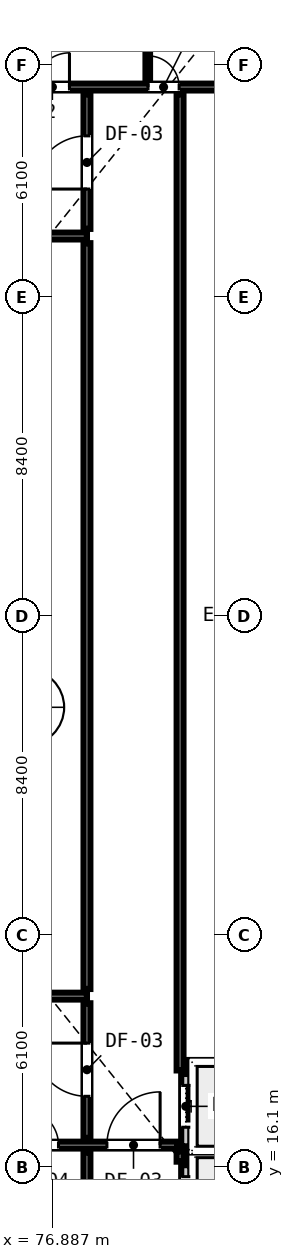
"""IFC4 building model, lengths in metres.
Left out: names, types, materials, properties, quantities, classifications, styles, units other than length and angle.
Written with IfcOpenShell. Run it as: python <this file> out.ifc"""

import sys

from ifc_helpers import new_model, si_unit, direction, frame, frame_2d, origin, place, context, subcontext, project, spatial, rectangle, extrude, element, fill, save


model = new_model("IFC4")
c1 = context("Model", 3, precision=1e-05, world=origin(), true_north=direction((0.0, 1.0)))
c2 = subcontext(c1, "Body", "Model", "MODEL_VIEW")
j1 = project(units=[si_unit("LENGTHUNIT", "METRE"), si_unit("PLANEANGLEUNIT", "RADIAN")], contexts=[c1])
p1 = place(None, origin())
s1 = spatial("IfcSite", under=j1, at=p1, CompositionType="ELEMENT")
p2 = place(p1, origin())
s2 = spatial("IfcBuilding", under=s1, at=p2, CompositionType="ELEMENT")
p3 = place(p2, origin())
s3 = spatial("IfcBuildingStorey", under=s2, at=p3, CompositionType="ELEMENT", Elevation=0.0)
p4 = place(p3, frame((80.4, 16.4, 0.0), z_axis=(0.0, 0.0, 1.0), x_axis=(1.0, 0.0, 0.0)))
e1 = element("IfcWall", 1, at=p4, inside=s3, PredefinedType="PARTITIONING", context=c2, shape_type="SweptSolid", body=[
    extrude(rectangle(XDim=2.2, YDim=0.24, at=frame_2d((1.1, 0.0))), origin(), (0.0, 0.0, 1.0), 4.92),
])
p5 = place(p3, frame((80.4, 14.448, 0.0), z_axis=(0.0, 0.0, 1.0), x_axis=(0.0, 1.0, 0.0)))
e2 = element("IfcWall", 2, at=p5, inside=s3, PredefinedType="PARTITIONING", context=c2, shape_type="SweptSolid", body=[
    extrude(rectangle(XDim=1.704, YDim=0.24, at=frame_2d((0.852, 0.0))), origin(), (0.0, 0.0, 1.0), 4.92),
])
p6 = place(p5, frame((0.302, 0.0, 0.0)))
e3 = element("IfcOpeningElement", 3, at=p6, cuts=e2, PredefinedType="OPENING", context=c2, shape_type="SweptSolid", body=[
    extrude(rectangle(XDim=1.1, YDim=2.15, at=frame_2d((0.55, 1.075))), frame((0.0, 0.13, 0.0), z_axis=(0.0, -1.0, 0.0), x_axis=(1.0, 0.0, 0.0)), (0.0, 0.0, 1.0), 0.26),
])
p7 = place(p3, frame((80.4, 18.8, 0.0), z_axis=(0.0, 0.0, 1.0), x_axis=(1.0, 0.0, 0.0)))
e4 = element("IfcWall", 4, at=p7, inside=s3, PredefinedType="PARTITIONING", context=c2, shape_type="SweptSolid", body=[
    extrude(rectangle(XDim=2.2, YDim=0.24, at=frame_2d((1.1, 0.0))), origin(), (0.0, 0.0, 1.0), 4.92),
])
p8 = place(p3, frame((80.4, 16.648, 0.0), z_axis=(0.0, 0.0, 1.0), x_axis=(0.0, 1.0, 0.0)))
e5 = element("IfcWall", 5, at=p8, inside=s3, PredefinedType="PARTITIONING", context=c2, shape_type="SweptSolid", body=[
    extrude(rectangle(XDim=1.904, YDim=0.24, at=frame_2d((0.952, 0.0))), origin(), (0.0, 0.0, 1.0), 4.92),
])
p9 = place(p8, frame((0.502, 0.0, 0.0)))
e6 = element("IfcOpeningElement", 6, at=p9, cuts=e5, PredefinedType="OPENING", context=c2, shape_type="SweptSolid", body=[
    extrude(rectangle(XDim=1.1, YDim=2.15, at=frame_2d((0.55, 1.075))), frame((0.0, 0.13, 0.0), z_axis=(0.0, -1.0, 0.0), x_axis=(1.0, 0.0, 0.0)), (0.0, 0.0, 1.0), 0.26),
])
p10 = place(p3, frame((64.7, 16.68, 0.0), z_axis=(0.0, 0.0, 1.0), x_axis=(1.0, 0.0, 0.0)))
e7 = element("IfcWall", 7, at=p10, inside=s3, PredefinedType="PARTITIONING", context=c2, shape_type="SweptSolid", body=[
    extrude(rectangle(XDim=15.482, YDim=0.18, at=frame_2d((7.741, 0.0))), origin(), (0.0, 0.0, 1.0), 4.92),
])
p11 = place(p10, frame((13.625, 0.0, 0.0)))
e8 = element("IfcOpeningElement", 8, at=p11, cuts=e7, PredefinedType="OPENING", context=c2, shape_type="SweptSolid", body=[
    extrude(rectangle(XDim=1.4, YDim=2.15, at=frame_2d((0.7, 1.075))), frame((0.0, 0.1, 0.0), z_axis=(0.0, -1.0, 0.0), x_axis=(1.0, 0.0, 0.0)), (0.0, 0.0, 1.0), 0.2),
])
p12 = place(p10, frame((3.25, 0.0, 0.0)))
e9 = element("IfcOpeningElement", 9, at=p12, cuts=e7, PredefinedType="OPENING", context=c2, shape_type="SweptSolid", body=[
    extrude(rectangle(XDim=0.9, YDim=2.1, at=frame_2d((0.45, 1.05))), frame((0.0, 0.1, 0.0), z_axis=(0.0, -1.0, 0.0), x_axis=(1.0, 0.0, 0.0)), (0.0, 0.0, 1.0), 0.2),
])
p13 = place(p10, frame((8.47, 0.0, 0.0)))
e10 = element("IfcOpeningElement", 10, at=p13, cuts=e7, PredefinedType="OPENING", context=c2, shape_type="SweptSolid", body=[
    extrude(rectangle(XDim=0.86, YDim=2.02, at=frame_2d((0.43, 1.01))), frame((0.0, 0.1, 0.0), z_axis=(0.0, -1.0, 0.0), x_axis=(1.0, 0.0, 0.0)), (0.0, 0.0, 1.0), 0.2),
])
p14 = place(p10, frame((11.401, 0.0, 0.0)))
e11 = element("IfcOpeningElement", 11, at=p14, cuts=e7, PredefinedType="OPENING", context=c2, shape_type="SweptSolid", body=[
    extrude(rectangle(XDim=0.95, YDim=2.1, at=frame_2d((0.475, 1.05))), frame((0.0, 0.1, 0.0), z_axis=(0.0, -1.0, 0.0), x_axis=(1.0, 0.0, 0.0)), (0.0, 0.0, 1.0), 0.2),
])
for number, where, z_axis, x_axis in (
    (12, (59.8, 20.6, 0.0), (0.0, 0.0, 1.0), (1.0, 0.0, 0.0)),
    (13, (59.8, 40.6, 0.0), (0.0, 0.0, 1.0), (1.0, 0.0, 0.0)),
):
    element("IfcWall", number, at=place(p3, frame(where, z_axis=z_axis, x_axis=x_axis)), inside=s3, PredefinedType="PARTITIONING", context=c2, shape_type="SweptSolid", body=[
        extrude(rectangle(XDim=18.0, YDim=0.18, at=frame_2d((9.0, 0.0))), origin(), (0.0, 0.0, 1.0), 4.92),
    ])
p15 = place(p3, frame((64.7, 44.52, 0.0), z_axis=(0.0, 0.0, 1.0), x_axis=(1.0, 0.0, 0.0)))
e14 = element("IfcWall", 14, at=p15, inside=s3, PredefinedType="PARTITIONING", context=c2, shape_type="SweptSolid", body=[
    extrude(rectangle(XDim=18.188, YDim=0.18, at=frame_2d((9.094, 0.0))), origin(), (0.0, 0.0, 1.0), 4.92),
])
p16 = place(p15, frame((3.25, 0.0, 0.0)))
e15 = element("IfcOpeningElement", 15, at=p16, cuts=e14, PredefinedType="OPENING", context=c2, shape_type="SweptSolid", body=[
    extrude(rectangle(XDim=0.9, YDim=2.1, at=frame_2d((0.45, 1.05))), frame((0.0, 0.1, 0.0), z_axis=(0.0, -1.0, 0.0), x_axis=(1.0, 0.0, 0.0)), (0.0, 0.0, 1.0), 0.2),
])
p17 = place(p15, frame((8.77, 0.0, 0.0)))
e16 = element("IfcOpeningElement", 16, at=p17, cuts=e14, PredefinedType="OPENING", context=c2, shape_type="SweptSolid", body=[
    extrude(rectangle(XDim=0.86, YDim=2.02, at=frame_2d((0.43, 1.01))), frame((0.0, 0.1, 0.0), z_axis=(0.0, -1.0, 0.0), x_axis=(1.0, 0.0, 0.0)), (0.0, 0.0, 1.0), 0.2),
])
p18 = place(p15, frame((11.74, 0.0, 0.0)))
e17 = element("IfcOpeningElement", 17, at=p18, cuts=e14, PredefinedType="OPENING", context=c2, shape_type="SweptSolid", body=[
    extrude(rectangle(XDim=0.9, YDim=2.1, at=frame_2d((0.45, 1.05))), frame((0.0, 0.1, 0.0), z_axis=(0.0, -1.0, 0.0), x_axis=(1.0, 0.0, 0.0)), (0.0, 0.0, 1.0), 0.2),
])
p19 = place(p15, frame((14.706, 0.0, 0.0)))
e18 = element("IfcOpeningElement", 18, at=p19, cuts=e14, PredefinedType="OPENING", context=c2, shape_type="SweptSolid", body=[
    extrude(rectangle(XDim=0.82, YDim=2.0, at=frame_2d((0.41, 1.0))), frame((0.0, 0.1, 0.0), z_axis=(0.0, -1.0, 0.0), x_axis=(1.0, 0.0, 0.0)), (0.0, 0.0, 1.0), 0.2),
])
p20 = place(p3, frame((77.8, 12.912, 0.0), z_axis=(0.0, 0.0, 1.0), x_axis=(0.0, 1.0, 0.0)))
e19 = element("IfcWall", 19, at=p20, inside=s3, PredefinedType="PARTITIONING", context=c2, shape_type="SweptSolid", body=[
    extrude(rectangle(XDim=3.58, YDim=0.18, at=frame_2d((1.79, 0.0))), origin(), (0.0, 0.0, 1.0), 4.92),
])
p21 = place(p3, frame((77.8, 16.868, 0.0), z_axis=(0.0, 0.0, 1.0), x_axis=(0.0, 1.0, 0.0)))
e20 = element("IfcWall", 20, at=p21, inside=s3, PredefinedType="PARTITIONING", context=c2, shape_type="SweptSolid", body=[
    extrude(rectangle(XDim=3.544, YDim=0.18, at=frame_2d((1.772, 0.0))), origin(), (0.0, 0.0, 1.0), 4.92),
])
p22 = place(p21, frame((1.096, 0.0, 0.0)))
e21 = element("IfcOpeningElement", 21, at=p22, cuts=e20, PredefinedType="OPENING", context=c2, shape_type="SweptSolid", body=[
    extrude(rectangle(XDim=1.4, YDim=2.15, at=frame_2d((0.7, 1.075))), frame((0.0, 0.1, 0.0), z_axis=(0.0, -1.0, 0.0), x_axis=(1.0, 0.0, 0.0)), (0.0, 0.0, 1.0), 0.2),
])
p23 = place(p3, frame((77.8, 20.788, 0.0), z_axis=(0.0, 0.0, 1.0), x_axis=(0.0, 1.0, 0.0)))
e22 = element("IfcWall", 22, at=p23, inside=s3, PredefinedType="PARTITIONING", context=c2, shape_type="SweptSolid", body=[
    extrude(rectangle(XDim=19.624, YDim=0.18, at=frame_2d((9.812, 0.0))), origin(), (0.0, 0.0, 1.0), 4.92),
])
p24 = place(p3, frame((77.8, 40.788, 0.0), z_axis=(0.0, 0.0, 1.0), x_axis=(0.0, 1.0, 0.0)))
e23 = element("IfcWall", 23, at=p24, inside=s3, PredefinedType="PARTITIONING", context=c2, shape_type="SweptSolid", body=[
    extrude(rectangle(XDim=3.544, YDim=0.18, at=frame_2d((1.772, 0.0))), origin(), (0.0, 0.0, 1.0), 4.92),
])
p25 = place(p24, frame((1.048, 0.0, 0.0)))
e24 = element("IfcOpeningElement", 24, at=p25, cuts=e23, PredefinedType="OPENING", context=c2, shape_type="SweptSolid", body=[
    extrude(rectangle(XDim=1.4, YDim=2.15, at=frame_2d((0.7, 1.075))), frame((0.0, 0.1, 0.0), z_axis=(0.0, -1.0, 0.0), x_axis=(1.0, 0.0, 0.0)), (0.0, 0.0, 1.0), 0.2),
])
p26 = place(p3, frame((80.25, 16.245, 0.0), z_axis=(0.0, 0.0, 1.0), x_axis=(0.0, 1.0, 0.0)))
e25 = element("IfcWall", 25, at=p26, inside=s3, PredefinedType="PARTITIONING", context=c2, shape_type="SweptSolid", body=[
    extrude(rectangle(XDim=0.275, YDim=0.18, at=frame_2d((0.137, 0.0))), origin(), (0.0, 0.0, 1.0), 4.92),
])
p27 = place(p3, frame((80.25, 18.645, 0.0), z_axis=(0.0, 0.0, 1.0), x_axis=(0.0, 1.0, 0.0)))
e26 = element("IfcWall", 26, at=p27, inside=s3, PredefinedType="PARTITIONING", context=c2, shape_type="SweptSolid", body=[
    extrude(rectangle(XDim=25.687, YDim=0.18, at=frame_2d((12.844, 0.0))), origin(), (0.0, 0.0, 1.0), 4.92),
])
p28 = place(p3, frame((79.4, 44.678, 0.0), z_axis=(0.0, 0.0, 1.0), x_axis=(0.0, 1.0, 0.0)))
e27 = element("IfcWall", 27, at=p28, inside=s3, PredefinedType="PARTITIONING", context=c2, shape_type="SweptSolid", body=[
    extrude(rectangle(XDim=3.61, YDim=0.12, at=frame_2d((1.805, 0.0))), origin(), (0.0, 0.0, 1.0), 4.92),
])
p29 = place(p6, origin())
e28 = element("IfcDoor", 28, at=p29, inside=s3, OperationType="SLIDING_TO_LEFT", PredefinedType="DOOR", context=c2, shape_type="SweptSolid", body=[
    extrude(rectangle(XDim=1.1, YDim=2.15, at=frame_2d((0.55, 1.075))), frame((0.0, 0.025, 0.0), z_axis=(0.0, -1.0, 0.0), x_axis=(1.0, 0.0, 0.0)), (0.0, 0.0, 1.0), 0.05),
])
fill(e3, e28)
p30 = place(p9, origin())
e29 = element("IfcDoor", 29, at=p30, inside=s3, OperationType="SLIDING_TO_RIGHT", PredefinedType="DOOR", context=c2, shape_type="SweptSolid", body=[
    extrude(rectangle(XDim=1.1, YDim=2.15, at=frame_2d((0.55, 1.075))), frame((0.0, 0.025, 0.0), z_axis=(0.0, -1.0, 0.0), x_axis=(1.0, 0.0, 0.0)), (0.0, 0.0, 1.0), 0.05),
])
fill(e6, e29)
p31 = place(p22, origin())
e30 = element("IfcDoor", 30, at=p31, inside=s3, OperationType="SINGLE_SWING_RIGHT", PredefinedType="DOOR", context=c2, shape_type="SweptSolid", body=[
    extrude(rectangle(XDim=1.4, YDim=2.15, at=frame_2d((0.7, 1.075))), frame((0.0, 0.025, 0.0), z_axis=(0.0, -1.0, 0.0), x_axis=(1.0, 0.0, 0.0)), (0.0, 0.0, 1.0), 0.05),
])
fill(e21, e30)
p32 = place(p25, origin())
e31 = element("IfcDoor", 31, at=p32, inside=s3, OperationType="SINGLE_SWING_LEFT", PredefinedType="DOOR", context=c2, shape_type="SweptSolid", body=[
    extrude(rectangle(XDim=1.4, YDim=2.15, at=frame_2d((0.7, 1.075))), frame((0.0, 0.025, 0.0), z_axis=(0.0, -1.0, 0.0), x_axis=(1.0, 0.0, 0.0)), (0.0, 0.0, 1.0), 0.05),
])
fill(e24, e31)
p33 = place(p11, origin())
e32 = element("IfcDoor", 32, at=p33, inside=s3, OperationType="SINGLE_SWING_RIGHT", PredefinedType="DOOR", context=c2, shape_type="SweptSolid", body=[
    extrude(rectangle(XDim=1.4, YDim=2.15, at=frame_2d((0.7, 1.075))), frame((0.0, 0.025, 0.0), z_axis=(0.0, -1.0, 0.0), x_axis=(1.0, 0.0, 0.0)), (0.0, 0.0, 1.0), 0.05),
])
fill(e8, e32)
p34 = place(p14, origin())
e33 = element("IfcDoor", 33, at=p34, inside=s3, OperationType="SINGLE_SWING_LEFT", PredefinedType="DOOR", context=c2, shape_type="SweptSolid", body=[
    extrude(rectangle(XDim=0.95, YDim=2.1, at=frame_2d((0.475, 1.05))), frame((0.0, 0.025, 0.0), z_axis=(0.0, -1.0, 0.0), x_axis=(1.0, 0.0, 0.0)), (0.0, 0.0, 1.0), 0.05),
])
fill(e11, e33)
p35 = place(p18, origin())
e34 = element("IfcDoor", 34, at=p35, inside=s3, OperationType="SINGLE_SWING_RIGHT", PredefinedType="DOOR", context=c2, shape_type="SweptSolid", body=[
    extrude(rectangle(XDim=0.9, YDim=2.1, at=frame_2d((0.45, 1.05))), frame((0.0, 0.025, 0.0), z_axis=(0.0, -1.0, 0.0), x_axis=(1.0, 0.0, 0.0)), (0.0, 0.0, 1.0), 0.05),
])
fill(e17, e34)
p36 = place(p19, origin())
e35 = element("IfcDoor", 35, at=p36, inside=s3, OperationType="SINGLE_SWING_LEFT", PredefinedType="DOOR", context=c2, shape_type="SweptSolid", body=[
    extrude(rectangle(XDim=0.82, YDim=2.0, at=frame_2d((0.41, 1.0))), frame((0.0, 0.025, 0.0), z_axis=(0.0, -1.0, 0.0), x_axis=(1.0, 0.0, 0.0)), (0.0, 0.0, 1.0), 0.05),
])
fill(e18, e35)
save(model, sys.argv[1])
